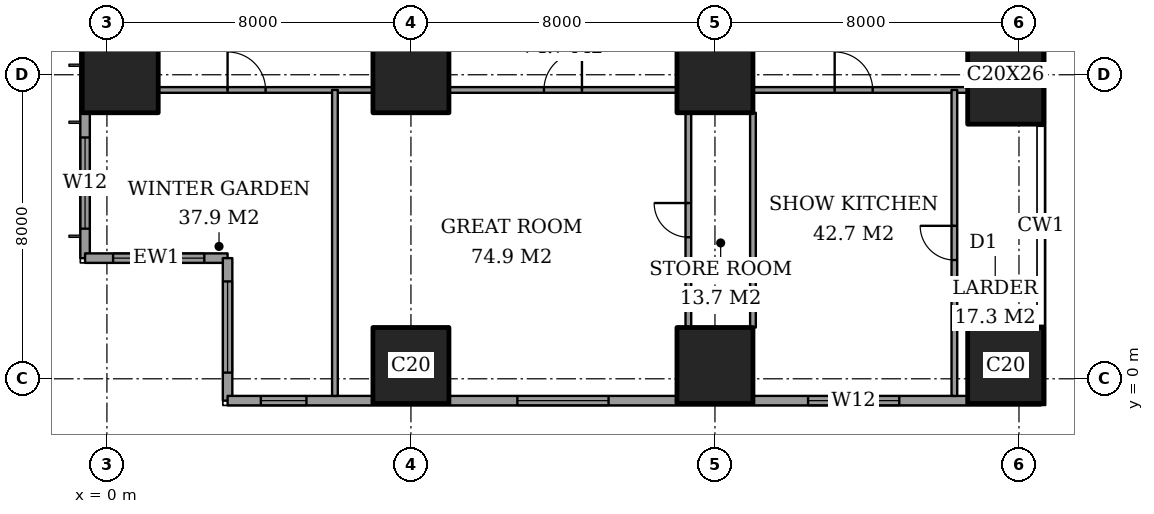
"""IFC4 building model, lengths in metres.
Left out: names, types, materials, properties, quantities, classifications, styles, units other than length and angle.
Written with IfcOpenShell. Run it as: python <this file> out.ifc"""

import sys

from ifc_helpers import new_model, si_unit, direction, frame, frame_2d, origin, origin_2d, place, context, subcontext, project, spatial, rectangle, extrude, element, fill, save


model = new_model("IFC4")
c1 = context("Model", 3, precision=1e-05, world=origin(), true_north=direction((0.0, 1.0)))
c2 = subcontext(c1, "Body", "Model", "MODEL_VIEW")
j1 = project(units=[si_unit("LENGTHUNIT", "METRE"), si_unit("PLANEANGLEUNIT", "RADIAN")], contexts=[c1])
p1 = place(None, origin())
s1 = spatial("IfcSite", under=j1, at=p1, CompositionType="ELEMENT")
p2 = place(p1, origin())
s2 = spatial("IfcBuilding", under=s1, at=p2, CompositionType="ELEMENT")
p3 = place(p2, frame((0.0, 0.0, 114.2)))
s3 = spatial("IfcBuildingStorey", under=s2, at=p3, CompositionType="ELEMENT", Elevation=114.2)
for number, where, z_axis, x_axis in (
    (1, (0.35, 8.0, 0.0), (0.0, 0.0, 1.0), (1.0, 0.0, 0.0)),
    (2, (8.0, 0.35, 0.0), (0.0, 0.0, 1.0), (1.0, 0.0, 0.0)),
    (3, (8.0, 8.0, 0.0), (0.0, 0.0, 1.0), (1.0, 0.0, 0.0)),
    (4, (16.0, 0.35, 0.0), (0.0, 0.0, 1.0), (1.0, 0.0, 0.0)),
    (5, (16.0, 8.0, 0.0), (0.0, 0.0, 1.0), (1.0, 0.0, 0.0)),
    (6, (23.65, 0.35, 0.0), (0.0, 0.0, 1.0), (1.0, 0.0, 0.0)),
):
    element("IfcColumn", number, at=place(p3, frame(where, z_axis=z_axis, x_axis=x_axis)), inside=s3, PredefinedType="COLUMN", context=c2, shape_type="SweptSolid", body=[
        extrude(rectangle(XDim=2.0, YDim=2.0, at=origin_2d()), origin(), (0.0, 0.0, 1.0), 3.6),
    ])
p4 = place(p3, frame((23.65, 8.0, 0.0), z_axis=(0.0, 0.0, 1.0), x_axis=(1.0, 0.0, 0.0)))
e7 = element("IfcColumn", 7, at=p4, inside=s3, PredefinedType="COLUMN", context=c2, shape_type="SweptSolid", body=[
    extrude(rectangle(XDim=2.0, YDim=2.6, at=origin_2d()), origin(), (0.0, 0.0, 1.0), 3.6),
])
p5 = place(p3, frame((-0.575, 44.825, 0.0), z_axis=(0.0, 0.0, 1.0), x_axis=(0.0, -1.0, 0.0)))
e8 = element("IfcWall", 8, at=p5, inside=s3, PredefinedType="SOLIDWALL", context=c2, shape_type="SweptSolid", body=[
    extrude(rectangle(XDim=41.65, YDim=0.25, at=frame_2d((20.825, 0.0))), origin(), (0.0, 0.0, 1.0), 3.6),
])
p6 = place(p5, frame((0.775, 0.0, 0.4)))
e9 = element("IfcOpeningElement", 9, at=p6, cuts=e8, PredefinedType="OPENING", context=c2, shape_type="SweptSolid", body=[
    extrude(rectangle(XDim=2.4, YDim=2.2, at=frame_2d((1.2, 1.1))), frame((0.0, 0.135, 0.0), z_axis=(0.0, -1.0, 0.0), x_axis=(1.0, 0.0, 0.0)), (0.0, 0.0, 1.0), 0.27),
])
p7 = place(p5, frame((6.2, 0.0, 0.4)))
e10 = element("IfcOpeningElement", 10, at=p7, cuts=e8, PredefinedType="OPENING", context=c2, shape_type="SweptSolid", body=[
    extrude(rectangle(XDim=1.2, YDim=2.2, at=frame_2d((0.6, 1.1))), frame((0.0, 0.135, 0.0), z_axis=(0.0, -1.0, 0.0), x_axis=(1.0, 0.0, 0.0)), (0.0, 0.0, 1.0), 0.27),
])
p8 = place(p5, frame((8.525, 0.0, 0.4)))
e11 = element("IfcOpeningElement", 11, at=p8, cuts=e8, PredefinedType="OPENING", context=c2, shape_type="SweptSolid", body=[
    extrude(rectangle(XDim=2.4, YDim=2.2, at=frame_2d((1.2, 1.1))), frame((0.0, 0.135, 0.0), z_axis=(0.0, -1.0, 0.0), x_axis=(1.0, 0.0, 0.0)), (0.0, 0.0, 1.0), 0.27),
])
p9 = place(p5, frame((15.625, 0.0, 0.4)))
e12 = element("IfcOpeningElement", 12, at=p9, cuts=e8, PredefinedType="OPENING", context=c2, shape_type="SweptSolid", body=[
    extrude(rectangle(XDim=2.4, YDim=2.2, at=frame_2d((1.2, 1.1))), frame((0.0, 0.135, 0.0), z_axis=(0.0, -1.0, 0.0), x_axis=(1.0, 0.0, 0.0)), (0.0, 0.0, 1.0), 0.27),
])
p10 = place(p5, frame((23.625, 0.0, 0.4)))
e13 = element("IfcOpeningElement", 13, at=p10, cuts=e8, PredefinedType="OPENING", context=c2, shape_type="SweptSolid", body=[
    extrude(rectangle(XDim=2.4, YDim=2.2, at=frame_2d((1.2, 1.1))), frame((0.0, 0.135, 0.0), z_axis=(0.0, -1.0, 0.0), x_axis=(1.0, 0.0, 0.0)), (0.0, 0.0, 1.0), 0.27),
])
p11 = place(p5, frame((30.825, 0.0, 0.4)))
e14 = element("IfcOpeningElement", 14, at=p11, cuts=e8, PredefinedType="OPENING", context=c2, shape_type="SweptSolid", body=[
    extrude(rectangle(XDim=2.4, YDim=2.2, at=frame_2d((1.2, 1.1))), frame((0.0, 0.135, 0.0), z_axis=(0.0, -1.0, 0.0), x_axis=(1.0, 0.0, 0.0)), (0.0, 0.0, 1.0), 0.27),
])
p12 = place(p5, frame((34.5, 0.0, 0.4)))
e15 = element("IfcOpeningElement", 15, at=p12, cuts=e8, PredefinedType="OPENING", context=c2, shape_type="SweptSolid", body=[
    extrude(rectangle(XDim=1.2, YDim=2.2, at=frame_2d((0.6, 1.1))), frame((0.0, 0.135, 0.0), z_axis=(0.0, -1.0, 0.0), x_axis=(1.0, 0.0, 0.0)), (0.0, 0.0, 1.0), 0.27),
])
p13 = place(p5, frame((38.475, 0.0, 0.4)))
e16 = element("IfcOpeningElement", 16, at=p13, cuts=e8, PredefinedType="OPENING", context=c2, shape_type="SweptSolid", body=[
    extrude(rectangle(XDim=2.4, YDim=2.2, at=frame_2d((1.2, 1.1))), frame((0.0, 0.135, 0.0), z_axis=(0.0, -1.0, 0.0), x_axis=(1.0, 0.0, 0.0)), (0.0, 0.0, 1.0), 0.27),
])
p14 = place(p3, frame((-0.575, 3.175, 0.0), z_axis=(0.0, 0.0, 1.0), x_axis=(1.0, 0.0, 0.0)))
e17 = element("IfcWall", 17, at=p14, inside=s3, PredefinedType="SOLIDWALL", context=c2, shape_type="SweptSolid", body=[
    extrude(rectangle(XDim=3.75, YDim=0.25, at=frame_2d((1.875, 0.0))), origin(), (0.0, 0.0, 1.0), 3.6),
])
p15 = place(p14, frame((0.738, 0.0, 0.4)))
e18 = element("IfcOpeningElement", 18, at=p15, cuts=e17, PredefinedType="OPENING", context=c2, shape_type="SweptSolid", body=[
    extrude(rectangle(XDim=2.4, YDim=2.2, at=frame_2d((1.2, 1.1))), frame((0.0, 0.135, 0.0), z_axis=(0.0, -1.0, 0.0), x_axis=(1.0, 0.0, 0.0)), (0.0, 0.0, 1.0), 0.27),
])
p16 = place(p3, frame((3.175, 3.175, 0.0), z_axis=(0.0, 0.0, 1.0), x_axis=(0.0, -1.0, 0.0)))
e19 = element("IfcWall", 19, at=p16, inside=s3, PredefinedType="SOLIDWALL", context=c2, shape_type="SweptSolid", body=[
    extrude(rectangle(XDim=3.75, YDim=0.25, at=frame_2d((1.875, 0.0))), origin(), (0.0, 0.0, 1.0), 3.6),
])
p17 = place(p16, frame((0.613, 0.0, 0.4)))
e20 = element("IfcOpeningElement", 20, at=p17, cuts=e19, PredefinedType="OPENING", context=c2, shape_type="SweptSolid", body=[
    extrude(rectangle(XDim=2.4, YDim=2.2, at=frame_2d((1.2, 1.1))), frame((0.0, 0.135, 0.0), z_axis=(0.0, -1.0, 0.0), x_axis=(1.0, 0.0, 0.0)), (0.0, 0.0, 1.0), 0.27),
])
p18 = place(p3, frame((3.175, -0.575, 0.0), z_axis=(0.0, 0.0, 1.0), x_axis=(1.0, 0.0, 0.0)))
e21 = element("IfcWall", 21, at=p18, inside=s3, PredefinedType="SOLIDWALL", context=c2, shape_type="SweptSolid", body=[
    extrude(rectangle(XDim=21.4, YDim=0.25, at=frame_2d((10.7, 0.0))), origin(), (0.0, 0.0, 1.0), 3.6),
])
p19 = place(p18, frame((0.875, 0.0, 0.4)))
e22 = element("IfcOpeningElement", 22, at=p19, cuts=e21, PredefinedType="OPENING", context=c2, shape_type="SweptSolid", body=[
    extrude(rectangle(XDim=1.2, YDim=2.2, at=frame_2d((0.6, 1.1))), frame((0.0, 0.135, 0.0), z_axis=(0.0, -1.0, 0.0), x_axis=(1.0, 0.0, 0.0)), (0.0, 0.0, 1.0), 0.27),
])
p20 = place(p18, frame((7.625, 0.0, 0.4)))
e23 = element("IfcOpeningElement", 23, at=p20, cuts=e21, PredefinedType="OPENING", context=c2, shape_type="SweptSolid", body=[
    extrude(rectangle(XDim=2.4, YDim=2.2, at=frame_2d((1.2, 1.1))), frame((0.0, 0.135, 0.0), z_axis=(0.0, -1.0, 0.0), x_axis=(1.0, 0.0, 0.0)), (0.0, 0.0, 1.0), 0.27),
])
p21 = place(p18, frame((15.275, 0.0, 0.4)))
e24 = element("IfcOpeningElement", 24, at=p21, cuts=e21, PredefinedType="OPENING", context=c2, shape_type="SweptSolid", body=[
    extrude(rectangle(XDim=2.4, YDim=2.2, at=frame_2d((1.2, 1.1))), frame((0.0, 0.135, 0.0), z_axis=(0.0, -1.0, 0.0), x_axis=(1.0, 0.0, 0.0)), (0.0, 0.0, 1.0), 0.27),
])
p22 = place(p3, frame((1.35, 7.6, 0.0), z_axis=(0.0, 0.0, 1.0), x_axis=(1.0, 0.0, 0.0)))
e25 = element("IfcWall", 25, at=p22, inside=s3, PredefinedType="PARTITIONING", context=c2, shape_type="SweptSolid", body=[
    extrude(rectangle(XDim=5.65, YDim=0.15, at=frame_2d((2.825, 0.0))), origin(), (0.0, 0.0, 1.0), 3.35),
])
p23 = place(p22, frame((1.825, 0.0, 0.0)))
e26 = element("IfcOpeningElement", 26, at=p23, cuts=e25, PredefinedType="OPENING", context=c2, shape_type="SweptSolid", body=[
    extrude(rectangle(XDim=1.0, YDim=2.1, at=frame_2d((0.5, 1.05))), frame((0.0, 0.085, 0.0), z_axis=(0.0, -1.0, 0.0), x_axis=(1.0, 0.0, 0.0)), (0.0, 0.0, 1.0), 0.17),
])
p24 = place(p3, frame((9.0, 7.6, 0.0), z_axis=(0.0, 0.0, 1.0), x_axis=(1.0, 0.0, 0.0)))
e27 = element("IfcWall", 27, at=p24, inside=s3, PredefinedType="PARTITIONING", context=c2, shape_type="SweptSolid", body=[
    extrude(rectangle(XDim=6.0, YDim=0.15, at=frame_2d((3.0, 0.0))), origin(), (0.0, 0.0, 1.0), 3.35),
])
p25 = place(p24, frame((2.5, 0.0, 0.0)))
e28 = element("IfcOpeningElement", 28, at=p25, cuts=e27, PredefinedType="OPENING", context=c2, shape_type="SweptSolid", body=[
    extrude(rectangle(XDim=1.0, YDim=2.1, at=frame_2d((0.5, 1.05))), frame((0.0, 0.085, 0.0), z_axis=(0.0, -1.0, 0.0), x_axis=(1.0, 0.0, 0.0)), (0.0, 0.0, 1.0), 0.17),
])
p26 = place(p3, frame((17.0, 7.6, 0.0), z_axis=(0.0, 0.0, 1.0), x_axis=(1.0, 0.0, 0.0)))
e29 = element("IfcWall", 29, at=p26, inside=s3, PredefinedType="PARTITIONING", context=c2, shape_type="SweptSolid", body=[
    extrude(rectangle(XDim=5.65, YDim=0.15, at=frame_2d((2.825, 0.0))), origin(), (0.0, 0.0, 1.0), 3.35),
])
p27 = place(p26, frame((2.15, 0.0, 0.0)))
e30 = element("IfcOpeningElement", 30, at=p27, cuts=e29, PredefinedType="OPENING", context=c2, shape_type="SweptSolid", body=[
    extrude(rectangle(XDim=1.0, YDim=2.1, at=frame_2d((0.5, 1.05))), frame((0.0, 0.085, 0.0), z_axis=(0.0, -1.0, 0.0), x_axis=(1.0, 0.0, 0.0)), (0.0, 0.0, 1.0), 0.17),
])
p28 = place(p3, frame((6.0, -0.45, 0.0), z_axis=(0.0, 0.0, 1.0), x_axis=(0.0, 1.0, 0.0)))
e31 = element("IfcWall", 31, at=p28, inside=s3, PredefinedType="PARTITIONING", context=c2, shape_type="SweptSolid", body=[
    extrude(rectangle(XDim=8.05, YDim=0.15, at=frame_2d((4.025, 0.0))), origin(), (0.0, 0.0, 1.0), 3.35),
])
p29 = place(p3, frame((15.3, 1.35, 0.0), z_axis=(0.0, 0.0, 1.0), x_axis=(0.0, 1.0, 0.0)))
e32 = element("IfcWall", 32, at=p29, inside=s3, PredefinedType="PARTITIONING", context=c2, shape_type="SweptSolid", body=[
    extrude(rectangle(XDim=5.65, YDim=0.15, at=frame_2d((2.825, 0.0))), origin(), (0.0, 0.0, 1.0), 3.35),
])
p30 = place(p29, frame((2.375, 0.0, 0.0)))
e33 = element("IfcOpeningElement", 33, at=p30, cuts=e32, PredefinedType="OPENING", context=c2, shape_type="SweptSolid", body=[
    extrude(rectangle(XDim=0.9, YDim=2.1, at=frame_2d((0.45, 1.05))), frame((0.0, 0.085, 0.0), z_axis=(0.0, -1.0, 0.0), x_axis=(1.0, 0.0, 0.0)), (0.0, 0.0, 1.0), 0.17),
])
p31 = place(p3, frame((17.0, 1.35, 0.0), z_axis=(0.0, 0.0, 1.0), x_axis=(0.0, 1.0, 0.0)))
e34 = element("IfcWall", 34, at=p31, inside=s3, PredefinedType="PARTITIONING", context=c2, shape_type="SweptSolid", body=[
    extrude(rectangle(XDim=5.65, YDim=0.15, at=frame_2d((2.825, 0.0))), origin(), (0.0, 0.0, 1.0), 3.35),
])
p32 = place(p3, frame((22.3, -0.45, 0.0), z_axis=(0.0, 0.0, 1.0), x_axis=(0.0, 1.0, 0.0)))
e35 = element("IfcWall", 35, at=p32, inside=s3, PredefinedType="PARTITIONING", context=c2, shape_type="SweptSolid", body=[
    extrude(rectangle(XDim=8.05, YDim=0.15, at=frame_2d((4.025, 0.0))), origin(), (0.0, 0.0, 1.0), 3.35),
])
p33 = place(p32, frame((3.575, 0.0, 0.0)))
e36 = element("IfcOpeningElement", 36, at=p33, cuts=e35, PredefinedType="OPENING", context=c2, shape_type="SweptSolid", body=[
    extrude(rectangle(XDim=0.9, YDim=2.1, at=frame_2d((0.45, 1.05))), frame((0.0, 0.085, 0.0), z_axis=(0.0, -1.0, 0.0), x_axis=(1.0, 0.0, 0.0)), (0.0, 0.0, 1.0), 0.17),
])
p34 = place(p13, origin())
e37 = element("IfcWindow", 37, at=p34, inside=s3, PartitioningType="SINGLE_PANEL", PredefinedType="WINDOW", context=c2, shape_type="SweptSolid", body=[
    extrude(rectangle(XDim=2.4, YDim=2.2, at=frame_2d((1.2, 1.1))), frame((0.0, 0.03, 0.0), z_axis=(0.0, -1.0, 0.0), x_axis=(1.0, 0.0, 0.0)), (0.0, 0.0, 1.0), 0.06),
])
fill(e16, e37)
p35 = place(p15, origin())
e38 = element("IfcWindow", 38, at=p35, inside=s3, PartitioningType="SINGLE_PANEL", PredefinedType="WINDOW", context=c2, shape_type="SweptSolid", body=[
    extrude(rectangle(XDim=2.4, YDim=2.2, at=frame_2d((1.2, 1.1))), frame((0.0, 0.03, 0.0), z_axis=(0.0, -1.0, 0.0), x_axis=(1.0, 0.0, 0.0)), (0.0, 0.0, 1.0), 0.06),
])
fill(e18, e38)
p36 = place(p17, origin())
e39 = element("IfcWindow", 39, at=p36, inside=s3, PartitioningType="SINGLE_PANEL", PredefinedType="WINDOW", context=c2, shape_type="SweptSolid", body=[
    extrude(rectangle(XDim=2.4, YDim=2.2, at=frame_2d((1.2, 1.1))), frame((0.0, 0.03, 0.0), z_axis=(0.0, -1.0, 0.0), x_axis=(1.0, 0.0, 0.0)), (0.0, 0.0, 1.0), 0.06),
])
fill(e20, e39)
p37 = place(p19, origin())
e40 = element("IfcWindow", 40, at=p37, inside=s3, PartitioningType="SINGLE_PANEL", PredefinedType="WINDOW", context=c2, shape_type="SweptSolid", body=[
    extrude(rectangle(XDim=1.2, YDim=2.2, at=frame_2d((0.6, 1.1))), frame((0.0, 0.03, 0.0), z_axis=(0.0, -1.0, 0.0), x_axis=(1.0, 0.0, 0.0)), (0.0, 0.0, 1.0), 0.06),
])
fill(e22, e40)
p38 = place(p20, origin())
e41 = element("IfcWindow", 41, at=p38, inside=s3, PartitioningType="SINGLE_PANEL", PredefinedType="WINDOW", context=c2, shape_type="SweptSolid", body=[
    extrude(rectangle(XDim=2.4, YDim=2.2, at=frame_2d((1.2, 1.1))), frame((0.0, 0.03, 0.0), z_axis=(0.0, -1.0, 0.0), x_axis=(1.0, 0.0, 0.0)), (0.0, 0.0, 1.0), 0.06),
])
fill(e23, e41)
p39 = place(p21, origin())
e42 = element("IfcWindow", 42, at=p39, inside=s3, PartitioningType="SINGLE_PANEL", PredefinedType="WINDOW", context=c2, shape_type="SweptSolid", body=[
    extrude(rectangle(XDim=2.4, YDim=2.2, at=frame_2d((1.2, 1.1))), frame((0.0, 0.03, 0.0), z_axis=(0.0, -1.0, 0.0), x_axis=(1.0, 0.0, 0.0)), (0.0, 0.0, 1.0), 0.06),
])
fill(e24, e42)
p40 = place(p23, origin())
e43 = element("IfcDoor", 43, at=p40, inside=s3, OperationType="SINGLE_SWING_RIGHT", PredefinedType="DOOR", context=c2, shape_type="SweptSolid", body=[
    extrude(rectangle(XDim=1.0, YDim=2.1, at=frame_2d((0.5, 1.05))), frame((0.0, 0.025, 0.0), z_axis=(0.0, -1.0, 0.0), x_axis=(1.0, 0.0, 0.0)), (0.0, 0.0, 1.0), 0.05),
])
fill(e26, e43)
p41 = place(p25, origin())
e44 = element("IfcDoor", 44, at=p41, inside=s3, OperationType="SINGLE_SWING_LEFT", PredefinedType="DOOR", context=c2, shape_type="SweptSolid", body=[
    extrude(rectangle(XDim=1.0, YDim=2.1, at=frame_2d((0.5, 1.05))), frame((0.0, 0.025, 0.0), z_axis=(0.0, -1.0, 0.0), x_axis=(1.0, 0.0, 0.0)), (0.0, 0.0, 1.0), 0.05),
])
fill(e28, e44)
p42 = place(p30, origin())
e45 = element("IfcDoor", 45, at=p42, inside=s3, OperationType="SINGLE_SWING_LEFT", PredefinedType="DOOR", context=c2, shape_type="SweptSolid", body=[
    extrude(rectangle(XDim=0.9, YDim=2.1, at=frame_2d((0.45, 1.05))), frame((0.0, 0.025, 0.0), z_axis=(0.0, -1.0, 0.0), x_axis=(1.0, 0.0, 0.0)), (0.0, 0.0, 1.0), 0.05),
])
fill(e33, e45)
p43 = place(p27, origin())
e46 = element("IfcDoor", 46, at=p43, inside=s3, OperationType="SINGLE_SWING_RIGHT", PredefinedType="DOOR", context=c2, shape_type="SweptSolid", body=[
    extrude(rectangle(XDim=1.0, YDim=2.1, at=frame_2d((0.5, 1.05))), frame((0.0, 0.025, 0.0), z_axis=(0.0, -1.0, 0.0), x_axis=(1.0, 0.0, 0.0)), (0.0, 0.0, 1.0), 0.05),
])
fill(e30, e46)
p44 = place(p33, origin())
e47 = element("IfcDoor", 47, at=p44, inside=s3, OperationType="SINGLE_SWING_LEFT", PredefinedType="DOOR", context=c2, shape_type="SweptSolid", body=[
    extrude(rectangle(XDim=0.9, YDim=2.1, at=frame_2d((0.45, 1.05))), frame((0.0, 0.025, 0.0), z_axis=(0.0, -1.0, 0.0), x_axis=(1.0, 0.0, 0.0)), (0.0, 0.0, 1.0), 0.05),
])
fill(e36, e47)
save(model, sys.argv[1])
